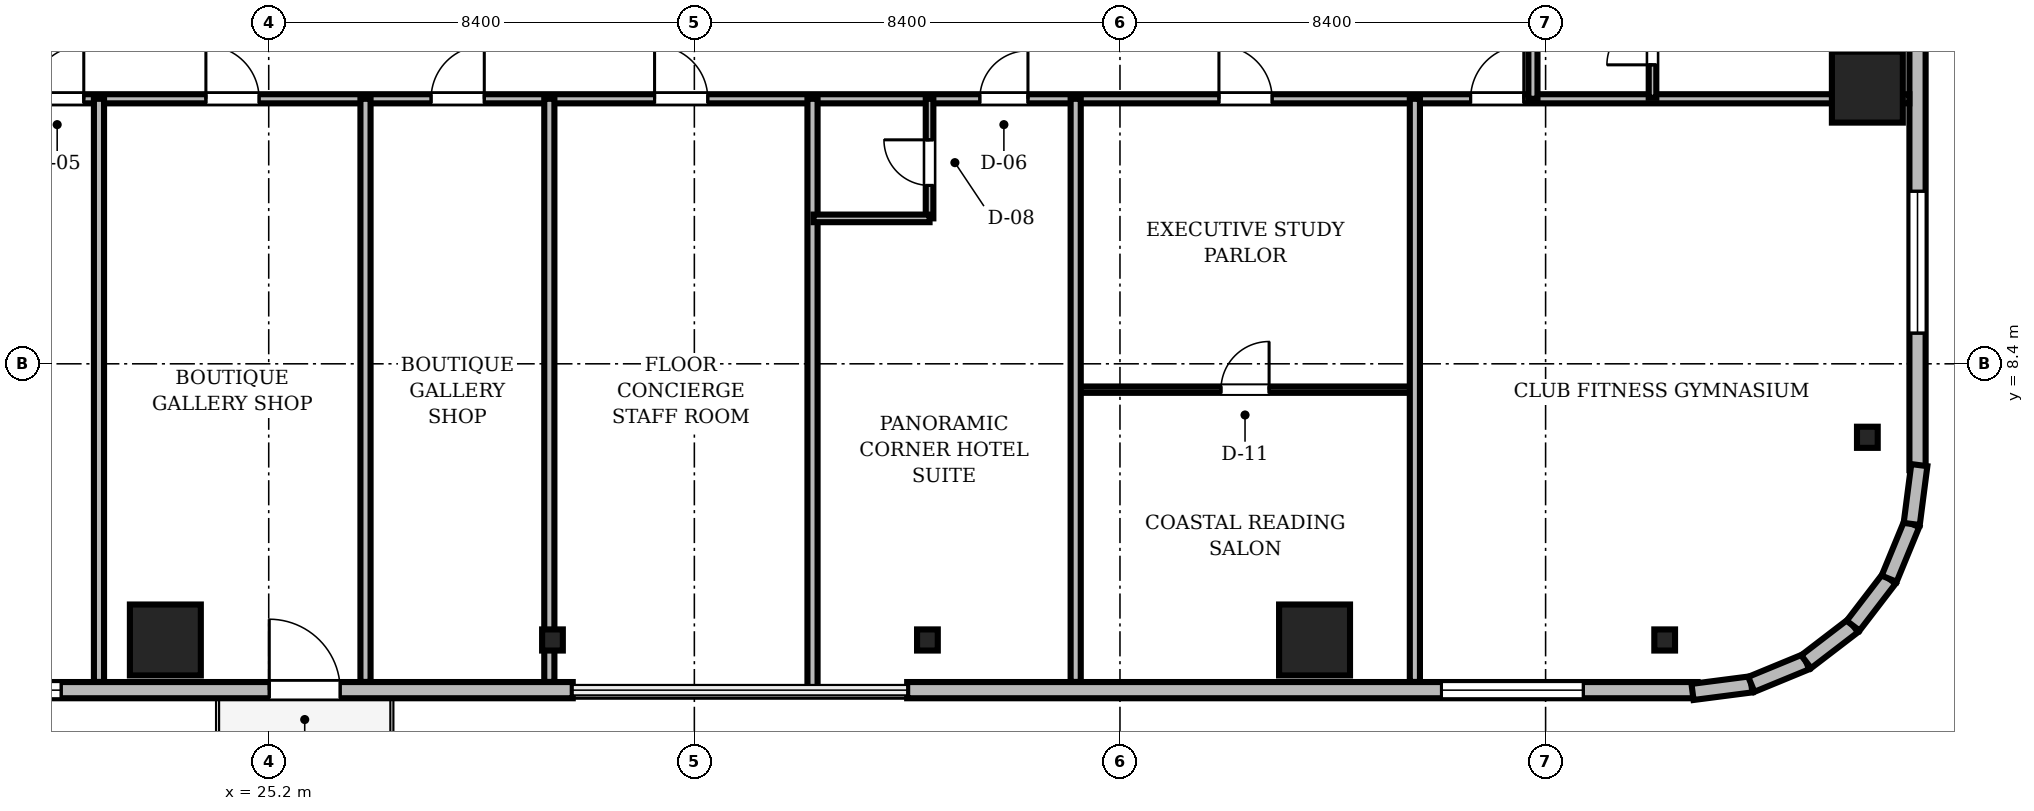
"""IFC4 building model, lengths in metres.
Left out: names, types, materials, properties, quantities, classifications, styles, units other than length and angle.
Written with IfcOpenShell. Run it as: python <this file> out.ifc"""

import sys

from ifc_helpers import new_model, si_unit, direction, frame, frame_2d, origin, origin_2d, place, context, subcontext, project, spatial, rectangle, i_section, extrude, source, transform, mapped, element, fill, save


model = new_model("IFC4")
c1 = context("Model", 3, precision=1e-05, world=origin(), true_north=direction((0.0, 1.0)))
c2 = subcontext(c1, "Body", "Model", "MODEL_VIEW")
j1 = project(units=[si_unit("LENGTHUNIT", "METRE"), si_unit("PLANEANGLEUNIT", "RADIAN")], contexts=[c1])
p1 = place(None, origin())
s1 = spatial("IfcSite", under=j1, at=p1, CompositionType="ELEMENT")
p2 = place(p1, origin())
s2 = spatial("IfcBuilding", under=s1, at=p2, CompositionType="ELEMENT")
p3 = place(p2, frame((0.0, 0.0, 196.05)))
s3 = spatial("IfcBuildingStorey", under=s2, at=p3, CompositionType="ELEMENT", Elevation=196.05)
m1 = source(origin(), c2, "Body", "SweptSolid", [
    extrude(rectangle(XDim=1.4, YDim=1.4, at=origin_2d()), origin(), (0.0, 0.0, 1.0), 3.53),
])
for number, where, z_axis, x_axis in (
    (1, (23.16, 2.95, 0.0), (0.0, 0.0, 1.0), (1.0, 0.0, 0.0)),
    (2, (45.84, 2.95, 0.0), (0.0, 0.0, 1.0), (1.0, 0.0, 0.0)),
    (3, (56.75, 13.86, 0.0), (0.0, 0.0, 1.0), (1.0, 0.0, 0.0)),
):
    element("IfcColumn", number, at=place(p3, frame(where, z_axis=z_axis, x_axis=x_axis)), inside=s3, PredefinedType="COLUMN", context=c2, shape_type="MappedRepresentation", body=[
        mapped(m1, transform((0.0, 0.0, 0.0), scale=1.0)),
    ])
m2 = source(origin(), c2, "Body", "SweptSolid", [
    extrude(i_section(OverallWidth=0.409, OverallDepth=0.417, WebThickness=0.021, FlangeThickness=0.033, FilletRadius=0.015, at=origin_2d()), origin(), (0.0, 0.0, 1.0), 3.53),
])
for number, where, z_axis, x_axis in (
    (4, (30.8, 2.95, 0.0), (0.0, 0.0, 1.0), (1.0, 0.0, 0.0)),
    (5, (38.2, 2.95, 0.0), (0.0, 0.0, 1.0), (1.0, 0.0, 0.0)),
    (6, (52.75, 2.95, 0.0), (0.0, 0.0, 1.0), (1.0, 0.0, 0.0)),
    (7, (56.75, 6.95, 0.0), (0.0, 0.0, 1.0), (1.0, 0.0, 0.0)),
):
    element("IfcColumn", number, at=place(p3, frame(where, z_axis=z_axis, x_axis=x_axis)), inside=s3, PredefinedType="COLUMN", context=c2, shape_type="MappedRepresentation", body=[
        mapped(m2, transform((0.0, 0.0, 0.0), scale=1.0)),
    ])
m3 = source(origin(), c2, "Body", "SweptSolid", [
    extrude(rectangle(XDim=15.6, YDim=0.32, at=frame_2d((7.8, 0.0))), origin(), (0.0, 0.0, 1.0), 3.53),
])
p4 = place(p3, frame((15.6, 1.96, 0.0), z_axis=(0.0, 0.0, 1.0), x_axis=(1.0, 0.0, 0.0)))
e8 = element("IfcWall", 8, at=p4, inside=s3, PredefinedType="SOLIDWALL", context=c2, shape_type="MappedRepresentation", body=[
    mapped(m3, transform((0.0, 0.0, 0.0), scale=1.0)),
])
m4 = source(origin(), c2, "Body", "SweptSolid", [
    extrude(rectangle(XDim=1.4, YDim=2.3, at=frame_2d((0.7, 1.15))), frame((0.0, 0.17, 0.0), z_axis=(0.0, -1.0, 0.0), x_axis=(1.0, 0.0, 0.0)), (0.0, 0.0, 1.0), 0.34),
])
p5 = place(p4, frame((9.61, 0.0, 0.0)))
e9 = element("IfcOpeningElement", 9, at=p5, cuts=e8, PredefinedType="OPENING", context=c2, shape_type="MappedRepresentation", body=[
    mapped(m4, transform((0.0, 0.0, 0.0), scale=1.0)),
])
m5 = source(origin(), c2, "Body", "SweptSolid", [
    extrude(rectangle(XDim=2.8, YDim=2.4, at=frame_2d((1.4, 1.2))), frame((0.0, 0.17, 0.0), z_axis=(0.0, -1.0, 0.0), x_axis=(1.0, 0.0, 0.0)), (0.0, 0.0, 1.0), 0.34),
])
p6 = place(p4, frame((2.705, 0.0, 0.72)))
e10 = element("IfcOpeningElement", 10, at=p6, cuts=e8, PredefinedType="OPENING", context=c2, shape_type="MappedRepresentation", body=[
    mapped(m5, transform((0.0, 0.0, 0.0), scale=1.0)),
])
p7 = place(p3, frame((37.8, 1.96, 0.0), z_axis=(0.0, 0.0, 1.0), x_axis=(1.0, 0.0, 0.0)))
e11 = element("IfcWall", 11, at=p7, inside=s3, PredefinedType="SOLIDWALL", context=c2, shape_type="MappedRepresentation", body=[
    mapped(m3, transform((0.0, 0.0, 0.0), scale=1.0)),
])
p8 = place(p7, frame((10.545, 0.0, 0.72)))
e12 = element("IfcOpeningElement", 12, at=p8, cuts=e11, PredefinedType="OPENING", context=c2, shape_type="MappedRepresentation", body=[
    mapped(m5, transform((0.0, 0.0, 0.0), scale=1.0)),
])
p9 = place(p3, frame((57.74, 6.3, 0.0), z_axis=(0.0, 0.0, 1.0), x_axis=(0.0, 1.0, 0.0)))
e13 = element("IfcWall", 13, at=p9, inside=s3, PredefinedType="SOLIDWALL", context=c2, shape_type="MappedRepresentation", body=[
    mapped(m3, transform((0.0, 0.0, 0.0), scale=1.0)),
])
p10 = place(p9, frame((9.61, 0.0, 0.0)))
e14 = element("IfcOpeningElement", 14, at=p10, cuts=e13, PredefinedType="OPENING", context=c2, shape_type="MappedRepresentation", body=[
    mapped(m4, transform((0.0, 0.0, 0.0), scale=1.0)),
])
p11 = place(p9, frame((2.705, 0.0, 0.72)))
e15 = element("IfcOpeningElement", 15, at=p11, cuts=e13, PredefinedType="OPENING", context=c2, shape_type="MappedRepresentation", body=[
    mapped(m5, transform((0.0, 0.0, 0.0), scale=1.0)),
])
m6 = source(origin(), c2, "Body", "SweptSolid", [
    extrude(rectangle(XDim=1.17, YDim=0.32, at=frame_2d((0.585, 0.0))), origin(), (0.0, 0.0, 1.0), 3.53),
])
p12 = place(p3, frame((53.3, 1.925, 0.0), z_axis=(0.0, 0.0, 1.0), x_axis=(0.991762485493, 0.128090485085, 0.0)))
e16 = element("IfcWall", 16, at=p12, inside=s3, PredefinedType="SOLIDWALL", context=c2, shape_type="MappedRepresentation", body=[
    mapped(m6, transform((0.0, 0.0, 0.0), scale=1.0)),
])
m7 = source(origin(), c2, "Body", "SweptSolid", [
    extrude(rectangle(XDim=1.169, YDim=0.32, at=frame_2d((0.585, 0.0))), origin(), (0.0, 0.0, 1.0), 3.53),
])
p13 = place(p3, frame((54.46, 2.074, 0.0), z_axis=(0.0, 0.0, 1.0), x_axis=(0.924479075121, 0.381232789334, 0.0)))
e17 = element("IfcWall", 17, at=p13, inside=s3, PredefinedType="SOLIDWALL", context=c2, shape_type="MappedRepresentation", body=[
    mapped(m7, transform((0.0, 0.0, 0.0), scale=1.0)),
])
m8 = source(origin(), c2, "Body", "SweptSolid", [
    extrude(rectangle(XDim=1.169, YDim=0.32, at=frame_2d((0.584, 0.0))), origin(), (0.0, 0.0, 1.0), 3.53),
])
p14 = place(p3, frame((55.541, 2.52, 0.0), z_axis=(0.0, 0.0, 1.0), x_axis=(0.793663520347, 0.608356981114, 0.0)))
e18 = element("IfcWall", 18, at=p14, inside=s3, PredefinedType="SOLIDWALL", context=c2, shape_type="MappedRepresentation", body=[
    mapped(m8, transform((0.0, 0.0, 0.0), scale=1.0)),
])
m9 = source(origin(), c2, "Body", "SweptSolid", [
    extrude(rectangle(XDim=1.169, YDim=0.32, at=frame_2d((0.584, 0.0))), origin(), (0.0, 0.0, 1.0), 3.53),
])
for number, where, z_axis, x_axis in (
    (19, (56.469, 3.231, 0.0), (0.0, 0.0, 1.0), (0.608, 0.794, 0.0)),
    (20, (57.18, 4.159, 0.0), (0.0, 0.0, 1.0), (0.381, 0.925, 0.0)),
):
    element("IfcWall", number, at=place(p3, frame(where, z_axis=z_axis, x_axis=x_axis)), inside=s3, PredefinedType="SOLIDWALL", context=c2, shape_type="MappedRepresentation", body=[
        mapped(m9, transform((0.0, 0.0, 0.0), scale=1.0)),
    ])
m10 = source(origin(), c2, "Body", "SweptSolid", [
    extrude(rectangle(XDim=1.171, YDim=0.32, at=frame_2d((0.585, 0.0))), origin(), (0.0, 0.0, 1.0), 3.53),
])
p15 = place(p3, frame((57.625, 5.24, 0.0), z_axis=(0.0, 0.0, 1.0), x_axis=(0.128269133229, 0.991739395941, 0.0)))
e21 = element("IfcWall", 21, at=p15, inside=s3, PredefinedType="SOLIDWALL", context=c2, shape_type="MappedRepresentation", body=[
    mapped(m10, transform((0.0, 0.0, 0.0), scale=1.0)),
])
m11 = source(origin(), c2, "Body", "SweptSolid", [
    extrude(rectangle(XDim=46.156, YDim=0.18, at=frame_2d((23.078, 0.0))), origin(), (0.0, 0.0, 1.0), 2.772),
])
p16 = place(p3, frame((11.422, 13.63, 0.0), z_axis=(0.0, 0.0, 1.0), x_axis=(1.0, 0.0, 0.0)))
e22 = element("IfcWall", 22, at=p16, inside=s3, PredefinedType="PARTITIONING", context=c2, shape_type="MappedRepresentation", body=[
    mapped(m11, transform((0.0, 0.0, 0.0), scale=1.0)),
])
m12 = source(origin(), c2, "Body", "SweptSolid", [
    extrude(rectangle(XDim=1.05, YDim=2.2, at=frame_2d((0.525, 1.1))), frame((0.0, 0.1, 0.0), z_axis=(0.0, -1.0, 0.0), x_axis=(1.0, 0.0, 0.0)), (0.0, 0.0, 1.0), 0.2),
])
p17 = place(p16, frame((9.078, 0.0, 0.0)))
e23 = element("IfcOpeningElement", 23, at=p17, cuts=e22, PredefinedType="OPENING", context=c2, shape_type="MappedRepresentation", body=[
    mapped(m12, transform((0.0, 0.0, 0.0), scale=1.0)),
])
p18 = place(p16, frame((12.538, 0.0, 0.0)))
e24 = element("IfcOpeningElement", 24, at=p18, cuts=e22, PredefinedType="OPENING", context=c2, shape_type="MappedRepresentation", body=[
    mapped(m12, transform((0.0, 0.0, 0.0), scale=1.0)),
])
p19 = place(p16, frame((16.982, 0.0, 0.0)))
e25 = element("IfcOpeningElement", 25, at=p19, cuts=e22, PredefinedType="OPENING", context=c2, shape_type="MappedRepresentation", body=[
    mapped(m12, transform((0.0, 0.0, 0.0), scale=1.0)),
])
p20 = place(p16, frame((21.393, 0.0, 0.0)))
e26 = element("IfcOpeningElement", 26, at=p20, cuts=e22, PredefinedType="OPENING", context=c2, shape_type="MappedRepresentation", body=[
    mapped(m12, transform((0.0, 0.0, 0.0), scale=1.0)),
])
m13 = source(origin(), c2, "Body", "SweptSolid", [
    extrude(rectangle(XDim=0.95, YDim=2.15, at=frame_2d((0.475, 1.075))), frame((0.0, 0.1, 0.0), z_axis=(0.0, -1.0, 0.0), x_axis=(1.0, 0.0, 0.0)), (0.0, 0.0, 1.0), 0.2),
])
p21 = place(p16, frame((27.812, 0.0, 0.0)))
e27 = element("IfcOpeningElement", 27, at=p21, cuts=e22, PredefinedType="OPENING", context=c2, shape_type="MappedRepresentation", body=[
    mapped(m13, transform((0.0, 0.0, 0.0), scale=1.0)),
])
p22 = place(p16, frame((32.531, 0.0, 0.0)))
e28 = element("IfcOpeningElement", 28, at=p22, cuts=e22, PredefinedType="OPENING", context=c2, shape_type="MappedRepresentation", body=[
    mapped(m12, transform((0.0, 0.0, 0.0), scale=1.0)),
])
p23 = place(p16, frame((37.498, 0.0, 0.0)))
e29 = element("IfcOpeningElement", 29, at=p23, cuts=e22, PredefinedType="OPENING", context=c2, shape_type="MappedRepresentation", body=[
    mapped(m12, transform((0.0, 0.0, 0.0), scale=1.0)),
])
m14 = source(origin(), c2, "Body", "SweptSolid", [
    extrude(rectangle(XDim=27.47, YDim=0.18, at=frame_2d((13.735, 0.0))), origin(), (0.0, 0.0, 1.0), 2.972),
])
p24 = place(p3, frame((50.15, 13.63, 0.0), z_axis=(0.0, 0.0, 1.0), x_axis=(0.0, 1.0, 0.0)))
e30 = element("IfcWall", 30, at=p24, inside=s3, PredefinedType="PARTITIONING", context=c2, shape_type="MappedRepresentation", body=[
    mapped(m14, transform((0.0, 0.0, 0.0), scale=1.0)),
])
p25 = place(p24, frame((4.071, 0.0, 0.0)))
e31 = element("IfcOpeningElement", 31, at=p25, cuts=e30, PredefinedType="OPENING", context=c2, shape_type="MappedRepresentation", body=[
    mapped(m12, transform((0.0, 0.0, 0.0), scale=1.0)),
])
p26 = place(p24, frame((10.884, 0.0, 0.0)))
e32 = element("IfcOpeningElement", 32, at=p26, cuts=e30, PredefinedType="OPENING", context=c2, shape_type="MappedRepresentation", body=[
    mapped(m12, transform((0.0, 0.0, 0.0), scale=1.0)),
])
p27 = place(p24, frame((17.696, 0.0, 0.0)))
e33 = element("IfcOpeningElement", 33, at=p27, cuts=e30, PredefinedType="OPENING", context=c2, shape_type="MappedRepresentation", body=[
    mapped(m12, transform((0.0, 0.0, 0.0), scale=1.0)),
])
p28 = place(p24, frame((24.509, 0.0, 0.0)))
e34 = element("IfcOpeningElement", 34, at=p28, cuts=e30, PredefinedType="OPENING", context=c2, shape_type="MappedRepresentation", body=[
    mapped(m12, transform((0.0, 0.0, 0.0), scale=1.0)),
])
m15 = source(origin(), c2, "Body", "SweptSolid", [
    extrude(rectangle(XDim=6.694, YDim=0.125, at=frame_2d((3.347, 0.0))), origin(), (0.0, 0.0, 1.0), 2.972),
])
p29 = place(p3, frame((41.126, 7.89, 0.0), z_axis=(0.0, 0.0, 1.0), x_axis=(1.0, 0.0, 0.0)))
e35 = element("IfcWall", 35, at=p29, inside=s3, PredefinedType="PARTITIONING", context=c2, shape_type="MappedRepresentation", body=[
    mapped(m15, transform((0.0, 0.0, 0.0), scale=1.0)),
])
m16 = source(origin(), c2, "Body", "SweptSolid", [
    extrude(rectangle(XDim=0.95, YDim=2.15, at=frame_2d((0.475, 1.075))), frame((0.0, 0.073, 0.0), z_axis=(0.0, -1.0, 0.0), x_axis=(1.0, 0.0, 0.0)), (0.0, 0.0, 1.0), 0.145),
])
p30 = place(p29, frame((2.867, 0.0, 0.0)))
e36 = element("IfcOpeningElement", 36, at=p30, cuts=e35, PredefinedType="OPENING", context=c2, shape_type="MappedRepresentation", body=[
    mapped(m16, transform((0.0, 0.0, 0.0), scale=1.0)),
])
m17 = source(origin(), c2, "Body", "SweptSolid", [
    extrude(rectangle(XDim=2.36, YDim=0.15, at=frame_2d((1.18, 0.0))), origin(), (0.0, 0.0, 1.0), 3.192),
])
p31 = place(p3, frame((38.242, 11.27, 0.0), z_axis=(0.0, 0.0, 1.0), x_axis=(0.0, 1.0, 0.0)))
e37 = element("IfcWall", 37, at=p31, inside=s3, PredefinedType="PARTITIONING", context=c2, shape_type="MappedRepresentation", body=[
    mapped(m17, transform((0.0, 0.0, 0.0), scale=1.0)),
])
m18 = source(origin(), c2, "Body", "SweptSolid", [
    extrude(rectangle(XDim=0.9, YDim=2.1, at=frame_2d((0.45, 1.05))), frame((0.0, 0.085, 0.0), z_axis=(0.0, -1.0, 0.0), x_axis=(1.0, 0.0, 0.0)), (0.0, 0.0, 1.0), 0.17),
])
p32 = place(p31, frame((0.65, 0.0, 0.0)))
e38 = element("IfcOpeningElement", 38, at=p32, cuts=e37, PredefinedType="OPENING", context=c2, shape_type="MappedRepresentation", body=[
    mapped(m18, transform((0.0, 0.0, 0.0), scale=1.0)),
])
m19 = source(origin(), c2, "Body", "SweptSolid", [
    extrude(rectangle(XDim=2.29, YDim=0.15, at=frame_2d((1.145, 0.0))), origin(), (0.0, 0.0, 1.0), 2.972),
])
p33 = place(p3, frame((52.51, 13.65, 0.0), z_axis=(0.0, 0.0, 1.0), x_axis=(0.0, 1.0, 0.0)))
e39 = element("IfcWall", 39, at=p33, inside=s3, PredefinedType="PARTITIONING", context=c2, shape_type="MappedRepresentation", body=[
    mapped(m19, transform((0.0, 0.0, 0.0), scale=1.0)),
])
p34 = place(p33, frame((0.65, 0.0, 0.0)))
e40 = element("IfcOpeningElement", 40, at=p34, cuts=e39, PredefinedType="OPENING", context=c2, shape_type="MappedRepresentation", body=[
    mapped(m18, transform((0.0, 0.0, 0.0), scale=1.0)),
])
m20 = source(origin(), c2, "Body", "SweptSolid", [
    extrude(rectangle(XDim=11.508, YDim=0.2, at=frame_2d((5.754, 0.0))), origin(), (0.0, 0.0, 1.0), 2.772),
])
for number, where, z_axis, x_axis in (
    (41, (21.85, 2.122, 0.0), (0.0, 0.0, 1.0), (0.0, 1.0, 0.0)),
    (42, (27.11, 2.122, 0.0), (0.0, 0.0, 1.0), (0.0, 1.0, 0.0)),
    (43, (30.738, 2.122, 0.0), (0.0, 0.0, 1.0), (0.0, 1.0, 0.0)),
):
    element("IfcWall", number, at=place(p3, frame(where, z_axis=z_axis, x_axis=x_axis)), inside=s3, PredefinedType="PARTITIONING", context=c2, shape_type="MappedRepresentation", body=[
        mapped(m20, transform((0.0, 0.0, 0.0), scale=1.0)),
    ])
m21 = source(origin(), c2, "Body", "SweptSolid", [
    extrude(rectangle(XDim=11.7, YDim=0.2, at=frame_2d((5.85, 0.0))), origin(), (0.0, 0.0, 1.0), 2.772),
])
p35 = place(p3, frame((35.932, 1.93, 0.0), z_axis=(0.0, 0.0, 1.0), x_axis=(0.0, 1.0, 0.0)))
e44 = element("IfcWall", 44, at=p35, inside=s3, PredefinedType="PARTITIONING", context=c2, shape_type="MappedRepresentation", body=[
    mapped(m21, transform((0.0, 0.0, 0.0), scale=1.0)),
])
for number, where, z_axis, x_axis in (
    (45, (41.126, 2.122, 0.0), (0.0, 0.0, 1.0), (0.0, 1.0, 0.0)),
    (46, (47.82, 2.122, 0.0), (0.0, 0.0, 1.0), (0.0, 1.0, 0.0)),
):
    element("IfcWall", number, at=place(p3, frame(where, z_axis=z_axis, x_axis=x_axis)), inside=s3, PredefinedType="PARTITIONING", context=c2, shape_type="MappedRepresentation", body=[
        mapped(m20, transform((0.0, 0.0, 0.0), scale=1.0)),
    ])
p36 = place(p3, frame((35.952, 11.27, 0.0), z_axis=(0.0, 0.0, 1.0), x_axis=(1.0, 0.0, 0.0)))
e47 = element("IfcWall", 47, at=p36, inside=s3, PredefinedType="PARTITIONING", context=c2, shape_type="MappedRepresentation", body=[
    mapped(m19, transform((0.0, 0.0, 0.0), scale=1.0)),
])
m22 = source(origin(), c2, "Body", "SweptSolid", [
    extrude(rectangle(XDim=1.4, YDim=2.3, at=frame_2d((0.7, 1.15))), frame((0.0, 0.025, 0.0), z_axis=(0.0, -1.0, 0.0), x_axis=(1.0, 0.0, 0.0)), (0.0, 0.0, 1.0), 0.05),
])
p37 = place(p5, frame((1.4, 0.0, 0.0), z_axis=(0.0, 0.0, 1.0), x_axis=(-1.0, 0.0, 0.0)))
e48 = element("IfcDoor", 48, at=p37, inside=s3, OperationType="DOUBLE_DOOR_SLIDING", PredefinedType="DOOR", context=c2, shape_type="MappedRepresentation", body=[
    mapped(m22, transform((0.0, 0.0, 0.0), scale=1.0)),
])
fill(e9, e48)
m23 = source(origin(), c2, "Body", "SweptSolid", [
    extrude(rectangle(XDim=2.8, YDim=2.4, at=frame_2d((1.4, 1.2))), frame((0.0, 0.03, 0.0), z_axis=(0.0, -1.0, 0.0), x_axis=(1.0, 0.0, 0.0)), (0.0, 0.0, 1.0), 0.06),
])
p38 = place(p6, origin())
e49 = element("IfcWindow", 49, at=p38, inside=s3, PartitioningType="SINGLE_PANEL", PredefinedType="WINDOW", context=c2, shape_type="MappedRepresentation", body=[
    mapped(m23, transform((0.0, 0.0, 0.0), scale=1.0)),
])
fill(e10, e49)
p39 = place(p8, origin())
e50 = element("IfcWindow", 50, at=p39, inside=s3, PartitioningType="SINGLE_PANEL", PredefinedType="WINDOW", context=c2, shape_type="MappedRepresentation", body=[
    mapped(m23, transform((0.0, 0.0, 0.0), scale=1.0)),
])
fill(e12, e50)
p40 = place(p11, origin())
e51 = element("IfcWindow", 51, at=p40, inside=s3, PartitioningType="SINGLE_PANEL", PredefinedType="WINDOW", context=c2, shape_type="MappedRepresentation", body=[
    mapped(m23, transform((0.0, 0.0, 0.0), scale=1.0)),
])
fill(e15, e51)
m24 = source(origin(), c2, "Body", "SweptSolid", [
    extrude(rectangle(XDim=1.05, YDim=2.2, at=frame_2d((0.525, 1.1))), frame((0.0, 0.025, 0.0), z_axis=(0.0, -1.0, 0.0), x_axis=(1.0, 0.0, 0.0)), (0.0, 0.0, 1.0), 0.05),
])
p41 = place(p17, origin())
e52 = element("IfcDoor", 52, at=p41, inside=s3, OperationType="SINGLE_SWING_RIGHT", PredefinedType="DOOR", context=c2, shape_type="MappedRepresentation", body=[
    mapped(m24, transform((0.0, 0.0, 0.0), scale=1.0)),
])
fill(e23, e52)
p42 = place(p18, origin())
e53 = element("IfcDoor", 53, at=p42, inside=s3, OperationType="SINGLE_SWING_LEFT", PredefinedType="DOOR", context=c2, shape_type="MappedRepresentation", body=[
    mapped(m24, transform((0.0, 0.0, 0.0), scale=1.0)),
])
fill(e24, e53)
p43 = place(p19, origin())
e54 = element("IfcDoor", 54, at=p43, inside=s3, OperationType="SINGLE_SWING_RIGHT", PredefinedType="DOOR", context=c2, shape_type="MappedRepresentation", body=[
    mapped(m24, transform((0.0, 0.0, 0.0), scale=1.0)),
])
fill(e25, e54)
p44 = place(p20, origin())
e55 = element("IfcDoor", 55, at=p44, inside=s3, OperationType="SINGLE_SWING_LEFT", PredefinedType="DOOR", context=c2, shape_type="MappedRepresentation", body=[
    mapped(m24, transform((0.0, 0.0, 0.0), scale=1.0)),
])
fill(e26, e55)
m25 = source(origin(), c2, "Body", "SweptSolid", [
    extrude(rectangle(XDim=0.95, YDim=2.15, at=frame_2d((0.475, 1.075))), frame((0.0, 0.025, 0.0), z_axis=(0.0, -1.0, 0.0), x_axis=(1.0, 0.0, 0.0)), (0.0, 0.0, 1.0), 0.05),
])
p45 = place(p21, origin())
e56 = element("IfcDoor", 56, at=p45, inside=s3, OperationType="SINGLE_SWING_RIGHT", PredefinedType="DOOR", context=c2, shape_type="MappedRepresentation", body=[
    mapped(m25, transform((0.0, 0.0, 0.0), scale=1.0)),
])
fill(e27, e56)
p46 = place(p22, origin())
e57 = element("IfcDoor", 57, at=p46, inside=s3, OperationType="SINGLE_SWING_LEFT", PredefinedType="DOOR", context=c2, shape_type="MappedRepresentation", body=[
    mapped(m24, transform((0.0, 0.0, 0.0), scale=1.0)),
])
fill(e28, e57)
p47 = place(p23, origin())
e58 = element("IfcDoor", 58, at=p47, inside=s3, OperationType="SINGLE_SWING_RIGHT", PredefinedType="DOOR", context=c2, shape_type="MappedRepresentation", body=[
    mapped(m24, transform((0.0, 0.0, 0.0), scale=1.0)),
])
fill(e29, e58)
p48 = place(p30, origin())
e59 = element("IfcDoor", 59, at=p48, inside=s3, OperationType="SINGLE_SWING_RIGHT", PredefinedType="DOOR", context=c2, shape_type="MappedRepresentation", body=[
    mapped(m25, transform((0.0, 0.0, 0.0), scale=1.0)),
])
fill(e36, e59)
m26 = source(origin(), c2, "Body", "SweptSolid", [
    extrude(rectangle(XDim=0.9, YDim=2.1, at=frame_2d((0.45, 1.05))), frame((0.0, 0.025, 0.0), z_axis=(0.0, -1.0, 0.0), x_axis=(1.0, 0.0, 0.0)), (0.0, 0.0, 1.0), 0.05),
])
p49 = place(p32, origin())
e60 = element("IfcDoor", 60, at=p49, inside=s3, OperationType="SINGLE_SWING_RIGHT", PredefinedType="DOOR", context=c2, shape_type="MappedRepresentation", body=[
    mapped(m26, transform((0.0, 0.0, 0.0), scale=1.0)),
])
fill(e38, e60)
p50 = place(p34, origin())
e61 = element("IfcDoor", 61, at=p50, inside=s3, OperationType="SINGLE_SWING_LEFT", PredefinedType="DOOR", context=c2, shape_type="MappedRepresentation", body=[
    mapped(m26, transform((0.0, 0.0, 0.0), scale=1.0)),
])
fill(e40, e61)
save(model, sys.argv[1])
